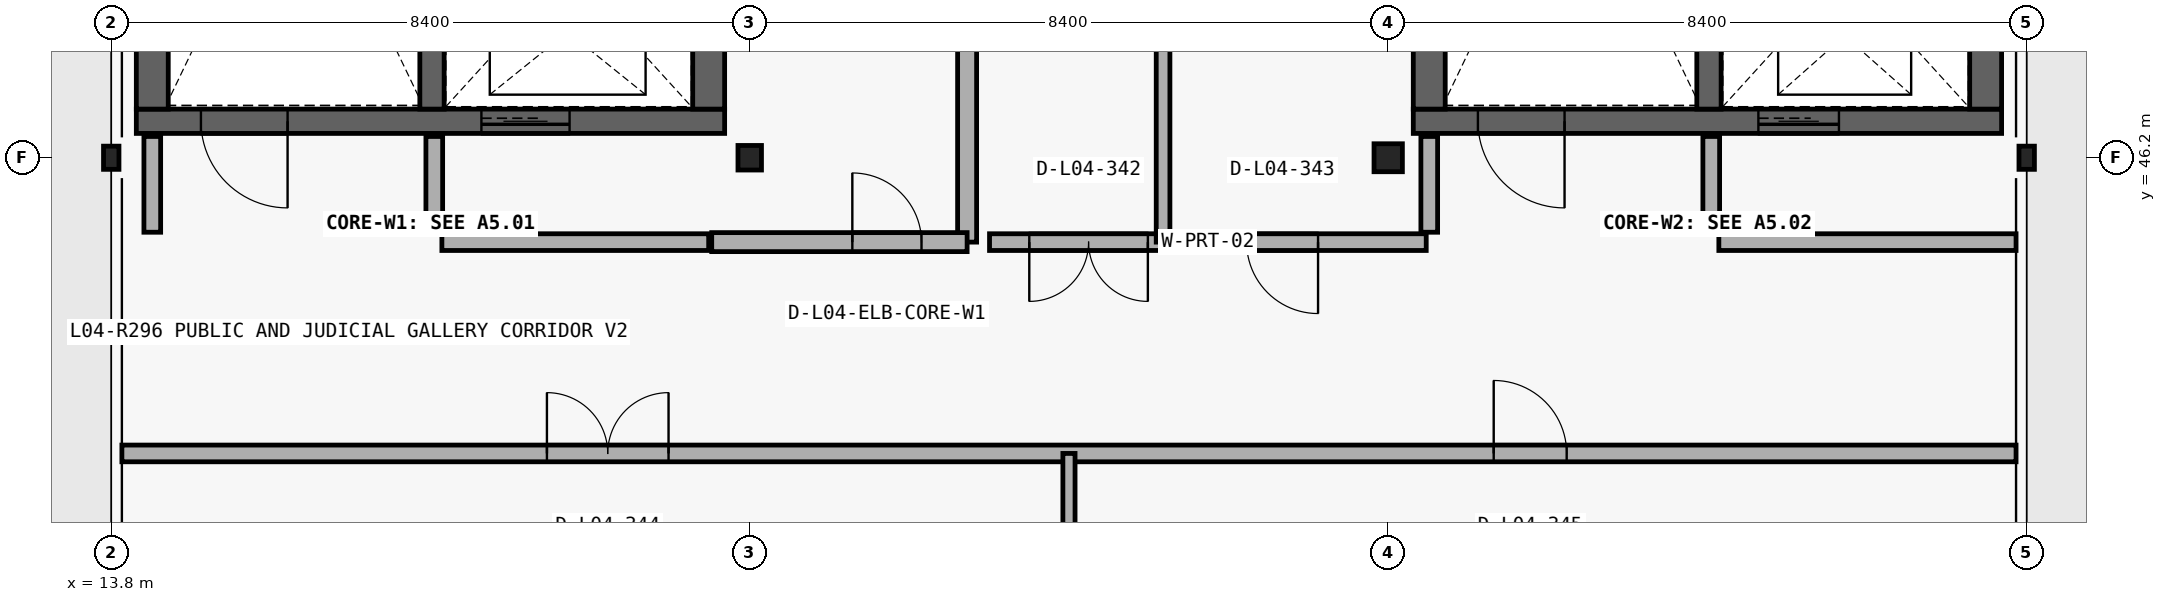
"""IFC4 building model, lengths in metres.
Left out: names, types, materials, properties, quantities, classifications, styles, units other than length and angle.
Written with IfcOpenShell. Run it as: python <this file> out.ifc"""

import sys

from ifc_helpers import new_model, si_unit, direction, frame, frame_2d, origin_with_axes, origin_2d_with_axis, place, context, subcontext, project, spatial, rectangle, hollow_rectangle, i_section, extrude, element, fill, save


model = new_model("IFC4")
c1 = context("Model", 3, precision=1e-05, world=origin_with_axes(), true_north=direction((0.0, 1.0)))
c2 = subcontext(c1, "Body", "Model", "MODEL_VIEW")
j1 = project(units=[si_unit("LENGTHUNIT", "METRE"), si_unit("PLANEANGLEUNIT", "RADIAN")], contexts=[c1])
p1 = place(None, origin_with_axes())
s1 = spatial("IfcSite", under=j1, at=p1, CompositionType="ELEMENT")
p2 = place(p1, origin_with_axes())
s2 = spatial("IfcBuilding", under=s1, at=p2, CompositionType="ELEMENT")
p3 = place(p2, frame((0.0, 0.0, 20.4), z_axis=(0.0, 0.0, 1.0), x_axis=(1.0, 0.0, 0.0)))
s3 = spatial("IfcBuildingStorey", under=s2, at=p3, CompositionType="ELEMENT", Elevation=20.4)
p4 = place(None, frame((14.13, 46.68, 20.4), z_axis=(0.0, 0.0, 1.0), x_axis=(1.0, 0.0, 0.0)))
e1 = element("IfcWall", 1, at=p4, inside=s3, PredefinedType="SHEAR", context=c2, shape_type="SweptSolid", body=[
    extrude(rectangle(XDim=7.74, YDim=0.32, at=frame_2d((3.87, 0.0), x_axis=(1.0, 0.0))), origin_with_axes(), (0.0, 0.0, 1.0), 4.5),
])
p5 = place(None, frame((15.55, 46.68, 20.4), z_axis=(0.0, 0.0, 1.0), x_axis=(1.0, 0.0, 0.0)))
e2 = element("IfcOpeningElement", 2, at=p5, cuts=e1, PredefinedType="OPENING", context=c2, shape_type="SweptSolid", body=[
    extrude(rectangle(XDim=1.14, YDim=2.18, at=frame_2d((0.0, 1.09), x_axis=(1.0, 0.0))), frame((0.0, 0.17, 0.0), z_axis=(0.0, -1.0, 0.0), x_axis=(1.0, 0.0, 0.0)), (0.0, 0.0, 1.0), 0.34),
])
p6 = place(None, frame((19.25, 46.68, 20.4), z_axis=(0.0, 0.0, 1.0), x_axis=(1.0, 0.0, 0.0)))
e3 = element("IfcOpeningElement", 3, at=p6, cuts=e1, PredefinedType="OPENING", context=c2, shape_type="SweptSolid", body=[
    extrude(rectangle(XDim=1.16, YDim=2.2, at=frame_2d((0.0, 1.1), x_axis=(1.0, 0.0))), frame((0.0, 0.17, 0.0), z_axis=(0.0, -1.0, 0.0), x_axis=(1.0, 0.0, 0.0)), (0.0, 0.0, 1.0), 0.34),
])
p7 = place(None, frame((21.66, 46.84, 20.4), z_axis=(0.0, 0.0, 1.0), x_axis=(0.0, 1.0, 0.0)))
e4 = element("IfcWall", 4, at=p7, inside=s3, PredefinedType="SHEAR", context=c2, shape_type="SweptSolid", body=[
    extrude(rectangle(XDim=7.12, YDim=0.42, at=frame_2d((3.56, 0.0), x_axis=(1.0, 0.0))), origin_with_axes(), (0.0, 0.0, 1.0), 4.5),
])
p8 = place(None, frame((21.66, 52.69, 20.4), z_axis=(0.0, 0.0, 1.0), x_axis=(0.0, 1.0, 0.0)))
e5 = element("IfcOpeningElement", 5, at=p8, cuts=e4, PredefinedType="OPENING", context=c2, shape_type="SweptSolid", body=[
    extrude(rectangle(XDim=1.16, YDim=2.2, at=frame_2d((0.0, 1.1), x_axis=(1.0, 0.0))), frame((0.0, 0.22, 0.0), z_axis=(0.0, -1.0, 0.0), x_axis=(1.0, 0.0, 0.0)), (0.0, 0.0, 1.0), 0.44),
])
p9 = place(None, frame((14.34, 53.96, 20.4), z_axis=(0.0, 0.0, 1.0), x_axis=(0.0, -1.0, 0.0)))
e6 = element("IfcWall", 6, at=p9, inside=s3, PredefinedType="SHEAR", context=c2, shape_type="SweptSolid", body=[
    extrude(rectangle(XDim=7.12, YDim=0.42, at=frame_2d((3.56, 0.0), x_axis=(1.0, 0.0))), origin_with_axes(), (0.0, 0.0, 1.0), 4.5),
])
p10 = place(None, frame((18.02, 46.84, 20.4), z_axis=(0.0, 0.0, 1.0), x_axis=(0.0, 1.0, 0.0)))
e7 = element("IfcWall", 7, at=p10, inside=s3, PredefinedType="SHEAR", context=c2, shape_type="SweptSolid", body=[
    extrude(rectangle(XDim=7.12, YDim=0.32, at=frame_2d((3.56, 0.0), x_axis=(1.0, 0.0))), origin_with_axes(), (0.0, 0.0, 1.0), 4.5),
])
p11 = place(None, frame((25.06, 45.09, 20.4), z_axis=(0.0, 0.0, 1.0), x_axis=(0.0, 1.0, 0.0)))
e8 = element("IfcWall", 8, at=p11, inside=s3, PredefinedType="PARTITIONING", context=c2, shape_type="SweptSolid", body=[
    extrude(rectangle(XDim=9.03, YDim=0.25, at=frame_2d((4.515, 0.0), x_axis=(1.0, 0.0))), origin_with_axes(), (0.0, 0.0, 1.0), 4.18),
])
p12 = place(None, frame((21.7, 45.09, 20.4), z_axis=(0.0, 0.0, 1.0), x_axis=(1.0, 0.0, 0.0)))
e9 = element("IfcWall", 9, at=p12, inside=s3, PredefinedType="PARTITIONING", context=c2, shape_type="SweptSolid", body=[
    extrude(rectangle(XDim=3.36, YDim=0.25, at=frame_2d((1.68, 0.0), x_axis=(1.0, 0.0))), origin_with_axes(), (0.0, 0.0, 1.0), 4.18),
])
p13 = place(None, frame((24.005, 45.09, 20.4), z_axis=(0.0, 0.0, 1.0), x_axis=(1.0, 0.0, 0.0)))
e10 = element("IfcOpeningElement", 10, at=p13, cuts=e9, PredefinedType="OPENING", context=c2, shape_type="SweptSolid", body=[
    extrude(rectangle(XDim=0.91, YDim=2.12, at=frame_2d((0.0, 1.06), x_axis=(1.0, 0.0))), frame((0.0, 0.135, 0.0), z_axis=(0.0, -1.0, 0.0), x_axis=(1.0, 0.0, 0.0)), (0.0, 0.0, 1.0), 0.27),
])
p14 = place(None, frame((30.93, 46.68, 20.4), z_axis=(0.0, 0.0, 1.0), x_axis=(1.0, 0.0, 0.0)))
e11 = element("IfcWall", 11, at=p14, inside=s3, PredefinedType="SHEAR", context=c2, shape_type="SweptSolid", body=[
    extrude(rectangle(XDim=7.74, YDim=0.32, at=frame_2d((3.87, 0.0), x_axis=(1.0, 0.0))), origin_with_axes(), (0.0, 0.0, 1.0), 4.5),
])
p15 = place(None, frame((32.35, 46.68, 20.4), z_axis=(0.0, 0.0, 1.0), x_axis=(1.0, 0.0, 0.0)))
e12 = element("IfcOpeningElement", 12, at=p15, cuts=e11, PredefinedType="OPENING", context=c2, shape_type="SweptSolid", body=[
    extrude(rectangle(XDim=1.14, YDim=2.18, at=frame_2d((0.0, 1.09), x_axis=(1.0, 0.0))), frame((0.0, 0.17, 0.0), z_axis=(0.0, -1.0, 0.0), x_axis=(1.0, 0.0, 0.0)), (0.0, 0.0, 1.0), 0.34),
])
p16 = place(None, frame((36.0, 46.68, 20.4), z_axis=(0.0, 0.0, 1.0), x_axis=(1.0, 0.0, 0.0)))
e13 = element("IfcOpeningElement", 13, at=p16, cuts=e11, PredefinedType="OPENING", context=c2, shape_type="SweptSolid", body=[
    extrude(rectangle(XDim=1.06, YDim=2.16, at=frame_2d((0.0, 1.08), x_axis=(1.0, 0.0))), frame((0.0, 0.17, 0.0), z_axis=(0.0, -1.0, 0.0), x_axis=(1.0, 0.0, 0.0)), (0.0, 0.0, 1.0), 0.34),
])
for number, where, z_axis, x_axis in (
    (14, (38.46, 46.84, 20.4), (0.0, 0.0, 1.0), (0.0, 1.0, 0.0)),
    (15, (31.14, 53.96, 20.4), (0.0, 0.0, 1.0), (0.0, -1.0, 0.0)),
):
    element("IfcWall", number, at=place(None, frame(where, z_axis=z_axis, x_axis=x_axis)), inside=s3, PredefinedType="SHEAR", context=c2, shape_type="SweptSolid", body=[
        extrude(rectangle(XDim=7.12, YDim=0.42, at=frame_2d((3.56, 0.0), x_axis=(1.0, 0.0))), origin_with_axes(), (0.0, 0.0, 1.0), 4.5),
    ])
p17 = place(None, frame((34.82, 46.84, 20.4), z_axis=(0.0, 0.0, 1.0), x_axis=(0.0, 1.0, 0.0)))
e16 = element("IfcWall", 16, at=p17, inside=s3, PredefinedType="SHEAR", context=c2, shape_type="SweptSolid", body=[
    extrude(rectangle(XDim=7.12, YDim=0.32, at=frame_2d((3.56, 0.0), x_axis=(1.0, 0.0))), origin_with_axes(), (0.0, 0.0, 1.0), 4.5),
])
for number, where, z_axis, x_axis in (
    (17, (14.34, 45.22, 20.4), (0.0, 0.0, 1.0), (0.0, 1.0, 0.0)),
    (18, (18.05, 45.22, 20.4), (0.0, 0.0, 1.0), (0.0, 1.0, 0.0)),
    (19, (31.14, 45.22, 20.4), (0.0, 0.0, 1.0), (0.0, 1.0, 0.0)),
    (20, (34.85, 45.22, 20.4), (0.0, 0.0, 1.0), (0.0, 1.0, 0.0)),
):
    element("IfcWall", number, at=place(None, frame(where, z_axis=z_axis, x_axis=x_axis)), inside=s3, PredefinedType="PARTITIONING", context=c2, shape_type="SweptSolid", body=[
        extrude(rectangle(XDim=1.26, YDim=0.22, at=frame_2d((0.63, 0.0), x_axis=(1.0, 0.0))), origin_with_axes(), (0.0, 0.0, 1.0), 4.18),
    ])
p18 = place(None, frame((18.15, 45.09, 20.4), z_axis=(0.0, 0.0, 1.0), x_axis=(1.0, 0.0, 0.0)))
e21 = element("IfcWall", 21, at=p18, inside=s3, PredefinedType="PARTITIONING", context=c2, shape_type="SweptSolid", body=[
    extrude(rectangle(XDim=3.51, YDim=0.22, at=frame_2d((1.755, 0.0), x_axis=(1.0, 0.0))), origin_with_axes(), (0.0, 0.0, 1.0), 4.18),
])
p19 = place(None, frame((25.355, 45.09, 20.4), z_axis=(0.0, 0.0, 1.0), x_axis=(1.0, 0.0, 0.0)))
e22 = element("IfcWall", 22, at=p19, inside=s3, PredefinedType="PARTITIONING", context=c2, shape_type="SweptSolid", body=[
    extrude(rectangle(XDim=5.745, YDim=0.22, at=frame_2d((2.873, 0.0), x_axis=(1.0, 0.0))), origin_with_axes(), (0.0, 0.0, 1.0), 4.18),
])
p20 = place(None, frame((26.658, 45.09, 20.4), z_axis=(0.0, 0.0, 1.0), x_axis=(1.0, 0.0, 0.0)))
e23 = element("IfcOpeningElement", 23, at=p20, cuts=e22, PredefinedType="OPENING", context=c2, shape_type="SweptSolid", body=[
    extrude(rectangle(XDim=1.56, YDim=2.28, at=frame_2d((0.0, 1.14), x_axis=(1.0, 0.0))), frame((0.0, 0.12, 0.0), z_axis=(0.0, -1.0, 0.0), x_axis=(1.0, 0.0, 0.0)), (0.0, 0.0, 1.0), 0.24),
])
p21 = place(None, frame((29.207, 45.09, 20.4), z_axis=(0.0, 0.0, 1.0), x_axis=(1.0, 0.0, 0.0)))
e24 = element("IfcOpeningElement", 24, at=p21, cuts=e22, PredefinedType="OPENING", context=c2, shape_type="SweptSolid", body=[
    extrude(rectangle(XDim=0.94, YDim=2.3, at=frame_2d((0.0, 1.15), x_axis=(1.0, 0.0))), frame((0.0, 0.12, 0.0), z_axis=(0.0, -1.0, 0.0), x_axis=(1.0, 0.0, 0.0)), (0.0, 0.0, 1.0), 0.24),
])
p22 = place(None, frame((34.95, 45.09, 20.4), z_axis=(0.0, 0.0, 1.0), x_axis=(1.0, 0.0, 0.0)))
e25 = element("IfcWall", 25, at=p22, inside=s3, PredefinedType="PARTITIONING", context=c2, shape_type="SweptSolid", body=[
    extrude(rectangle(XDim=3.91, YDim=0.22, at=frame_2d((1.955, 0.0), x_axis=(1.0, 0.0))), origin_with_axes(), (0.0, 0.0, 1.0), 4.18),
])
p23 = place(None, frame((13.94, 42.31, 20.4), z_axis=(0.0, 0.0, 1.0), x_axis=(1.0, 0.0, 0.0)))
e26 = element("IfcWall", 26, at=p23, inside=s3, PredefinedType="PARTITIONING", context=c2, shape_type="SweptSolid", body=[
    extrude(rectangle(XDim=24.92, YDim=0.22, at=frame_2d((12.46, 0.0), x_axis=(1.0, 0.0))), origin_with_axes(), (0.0, 0.0, 1.0), 4.18),
])
p24 = place(None, frame((20.332, 42.31, 20.4), z_axis=(0.0, 0.0, 1.0), x_axis=(1.0, 0.0, 0.0)))
e27 = element("IfcOpeningElement", 27, at=p24, cuts=e26, PredefinedType="OPENING", context=c2, shape_type="SweptSolid", body=[
    extrude(rectangle(XDim=1.6, YDim=2.32, at=frame_2d((0.0, 1.16), x_axis=(1.0, 0.0))), frame((0.0, 0.12, 0.0), z_axis=(0.0, -1.0, 0.0), x_axis=(1.0, 0.0, 0.0)), (0.0, 0.0, 1.0), 0.24),
])
p25 = place(None, frame((32.468, 42.31, 20.4), z_axis=(0.0, 0.0, 1.0), x_axis=(1.0, 0.0, 0.0)))
e28 = element("IfcOpeningElement", 28, at=p25, cuts=e26, PredefinedType="OPENING", context=c2, shape_type="SweptSolid", body=[
    extrude(rectangle(XDim=0.96, YDim=2.2, at=frame_2d((0.0, 1.1), x_axis=(1.0, 0.0))), frame((0.0, 0.12, 0.0), z_axis=(0.0, -1.0, 0.0), x_axis=(1.0, 0.0, 0.0)), (0.0, 0.0, 1.0), 0.24),
])
p26 = place(None, frame((27.638, 45.09, 20.4), z_axis=(0.0, 0.0, 1.0), x_axis=(0.0, 1.0, 0.0)))
e29 = element("IfcWall", 29, at=p26, inside=s3, PredefinedType="PARTITIONING", context=c2, shape_type="SweptSolid", body=[
    extrude(rectangle(XDim=9.37, YDim=0.18, at=frame_2d((4.685, 0.0), x_axis=(1.0, 0.0))), origin_with_axes(), (0.0, 0.0, 1.0), 4.18),
])
p27 = place(None, frame((26.4, 39.14, 20.4), z_axis=(0.0, 0.0, 1.0), x_axis=(0.0, 1.0, 0.0)))
e30 = element("IfcWall", 30, at=p27, inside=s3, PredefinedType="PARTITIONING", context=c2, shape_type="SweptSolid", body=[
    extrude(rectangle(XDim=3.17, YDim=0.16, at=frame_2d((1.585, 0.0), x_axis=(1.0, 0.0))), origin_with_axes(), (0.0, 0.0, 1.0), 4.18),
])
p28 = place(None, frame((13.8, 46.2, 20.4), z_axis=(0.0, 0.0, 1.0), x_axis=(1.0, 0.0, 0.0)))
e31 = element("IfcColumn", 31, at=p28, inside=s3, PredefinedType="COLUMN", context=c2, shape_type="SweptSolid", body=[
    extrude(hollow_rectangle(XDim=0.203, YDim=0.305, WallThickness=0.013, InnerFilletRadius=0.025, OuterFilletRadius=0.013, at=origin_2d_with_axis()), origin_with_axes(), (0.0, 0.0, 1.0), 4.5),
])
p29 = place(None, frame((22.2, 46.2, 20.4), z_axis=(0.0, 0.0, 1.0), x_axis=(1.0, 0.0, 0.0)))
e32 = element("IfcColumn", 32, at=p29, inside=s3, PredefinedType="COLUMN", context=c2, shape_type="SweptSolid", body=[
    extrude(i_section(OverallWidth=0.309, OverallDepth=0.323, WebThickness=0.014, FlangeThickness=0.023, at=origin_2d_with_axis()), origin_with_axes(), (0.0, 0.0, 1.0), 4.5),
])
p30 = place(None, frame((30.6, 46.2, 20.4), z_axis=(0.0, 0.0, 1.0), x_axis=(1.0, 0.0, 0.0)))
e33 = element("IfcColumn", 33, at=p30, inside=s3, PredefinedType="COLUMN", context=c2, shape_type="SweptSolid", body=[
    extrude(i_section(OverallWidth=0.373, OverallDepth=0.368, WebThickness=0.015, FlangeThickness=0.024, at=origin_2d_with_axis()), origin_with_axes(), (0.0, 0.0, 1.0), 4.5),
])
p31 = place(None, frame((39.0, 46.2, 20.4), z_axis=(0.0, 0.0, 1.0), x_axis=(1.0, 0.0, 0.0)))
e34 = element("IfcColumn", 34, at=p31, inside=s3, PredefinedType="COLUMN", context=c2, shape_type="SweptSolid", body=[
    extrude(hollow_rectangle(XDim=0.203, YDim=0.305, WallThickness=0.013, InnerFilletRadius=0.025, OuterFilletRadius=0.013, at=origin_2d_with_axis()), origin_with_axes(), (0.0, 0.0, 1.0), 4.5),
])
p32 = place(None, frame((15.55, 46.68, 20.4), z_axis=(0.0, 0.0, 1.0), x_axis=(-1.0, 0.0, 0.0)))
e35 = element("IfcDoor", 35, at=p32, inside=s3, OperationType="SINGLE_SWING_RIGHT", PredefinedType="DOOR", context=c2, shape_type="SweptSolid", body=[
    extrude(rectangle(XDim=1.14, YDim=2.18, at=frame_2d((0.0, 1.09), x_axis=(1.0, 0.0))), frame((0.0, 0.04, 0.0), z_axis=(0.0, -1.0, 0.0), x_axis=(1.0, 0.0, 0.0)), (0.0, 0.0, 1.0), 0.08),
])
fill(e2, e35)
p33 = place(None, frame((19.25, 46.68, 20.4), z_axis=(0.0, 0.0, 1.0), x_axis=(-1.0, 0.0, 0.0)))
e36 = element("IfcDoor", 36, at=p33, inside=s3, OperationType="SLIDING_TO_LEFT", PredefinedType="DOOR", context=c2, shape_type="SweptSolid", body=[
    extrude(rectangle(XDim=1.16, YDim=2.2, at=frame_2d((0.0, 1.1), x_axis=(1.0, 0.0))), frame((0.0, 0.04, 0.0), z_axis=(0.0, -1.0, 0.0), x_axis=(1.0, 0.0, 0.0)), (0.0, 0.0, 1.0), 0.08),
])
fill(e3, e36)
p34 = place(None, frame((24.005, 45.09, 20.4), z_axis=(0.0, 0.0, 1.0), x_axis=(1.0, 0.0, 0.0)))
e37 = element("IfcDoor", 37, at=p34, inside=s3, OperationType="SINGLE_SWING_LEFT", PredefinedType="DOOR", context=c2, shape_type="SweptSolid", body=[
    extrude(rectangle(XDim=0.91, YDim=2.12, at=frame_2d((0.0, 1.06), x_axis=(1.0, 0.0))), frame((0.0, 0.04, 0.0), z_axis=(0.0, -1.0, 0.0), x_axis=(1.0, 0.0, 0.0)), (0.0, 0.0, 1.0), 0.08),
])
fill(e10, e37)
p35 = place(None, frame((32.35, 46.68, 20.4), z_axis=(0.0, 0.0, 1.0), x_axis=(-1.0, 0.0, 0.0)))
e38 = element("IfcDoor", 38, at=p35, inside=s3, OperationType="SINGLE_SWING_RIGHT", PredefinedType="DOOR", context=c2, shape_type="SweptSolid", body=[
    extrude(rectangle(XDim=1.14, YDim=2.18, at=frame_2d((0.0, 1.09), x_axis=(1.0, 0.0))), frame((0.0, 0.04, 0.0), z_axis=(0.0, -1.0, 0.0), x_axis=(1.0, 0.0, 0.0)), (0.0, 0.0, 1.0), 0.08),
])
fill(e12, e38)
p36 = place(None, frame((36.0, 46.68, 20.4), z_axis=(0.0, 0.0, 1.0), x_axis=(-1.0, 0.0, 0.0)))
e39 = element("IfcDoor", 39, at=p36, inside=s3, OperationType="SLIDING_TO_LEFT", PredefinedType="DOOR", context=c2, shape_type="SweptSolid", body=[
    extrude(rectangle(XDim=1.06, YDim=2.16, at=frame_2d((0.0, 1.08), x_axis=(1.0, 0.0))), frame((0.0, 0.04, 0.0), z_axis=(0.0, -1.0, 0.0), x_axis=(1.0, 0.0, 0.0)), (0.0, 0.0, 1.0), 0.08),
])
fill(e13, e39)
p37 = place(None, frame((26.658, 45.09, 20.4), z_axis=(0.0, 0.0, 1.0), x_axis=(-1.0, 0.0, 0.0)))
e40 = element("IfcDoor", 40, at=p37, inside=s3, OperationType="DOUBLE_DOOR_SINGLE_SWING", PredefinedType="DOOR", context=c2, shape_type="SweptSolid", body=[
    extrude(rectangle(XDim=1.56, YDim=2.28, at=frame_2d((0.0, 1.14), x_axis=(1.0, 0.0))), frame((0.0, 0.04, 0.0), z_axis=(0.0, -1.0, 0.0), x_axis=(1.0, 0.0, 0.0)), (0.0, 0.0, 1.0), 0.08),
])
fill(e23, e40)
p38 = place(None, frame((29.207, 45.09, 20.4), z_axis=(0.0, 0.0, 1.0), x_axis=(-1.0, 0.0, 0.0)))
e41 = element("IfcDoor", 41, at=p38, inside=s3, OperationType="SINGLE_SWING_RIGHT", PredefinedType="DOOR", context=c2, shape_type="SweptSolid", body=[
    extrude(rectangle(XDim=0.94, YDim=2.3, at=frame_2d((0.0, 1.15), x_axis=(1.0, 0.0))), frame((0.0, 0.04, 0.0), z_axis=(0.0, -1.0, 0.0), x_axis=(1.0, 0.0, 0.0)), (0.0, 0.0, 1.0), 0.08),
])
fill(e24, e41)
p39 = place(None, frame((20.332, 42.31, 20.4), z_axis=(0.0, 0.0, 1.0), x_axis=(1.0, 0.0, 0.0)))
e42 = element("IfcDoor", 42, at=p39, inside=s3, OperationType="DOUBLE_DOOR_SINGLE_SWING", PredefinedType="DOOR", context=c2, shape_type="SweptSolid", body=[
    extrude(rectangle(XDim=1.6, YDim=2.32, at=frame_2d((0.0, 1.16), x_axis=(1.0, 0.0))), frame((0.0, 0.04, 0.0), z_axis=(0.0, -1.0, 0.0), x_axis=(1.0, 0.0, 0.0)), (0.0, 0.0, 1.0), 0.08),
])
fill(e27, e42)
p40 = place(None, frame((32.468, 42.31, 20.4), z_axis=(0.0, 0.0, 1.0), x_axis=(1.0, 0.0, 0.0)))
e43 = element("IfcDoor", 43, at=p40, inside=s3, OperationType="SINGLE_SWING_LEFT", PredefinedType="DOOR", context=c2, shape_type="SweptSolid", body=[
    extrude(rectangle(XDim=0.96, YDim=2.2, at=frame_2d((0.0, 1.1), x_axis=(1.0, 0.0))), frame((0.0, 0.04, 0.0), z_axis=(0.0, -1.0, 0.0), x_axis=(1.0, 0.0, 0.0)), (0.0, 0.0, 1.0), 0.08),
])
fill(e28, e43)
save(model, sys.argv[1])
